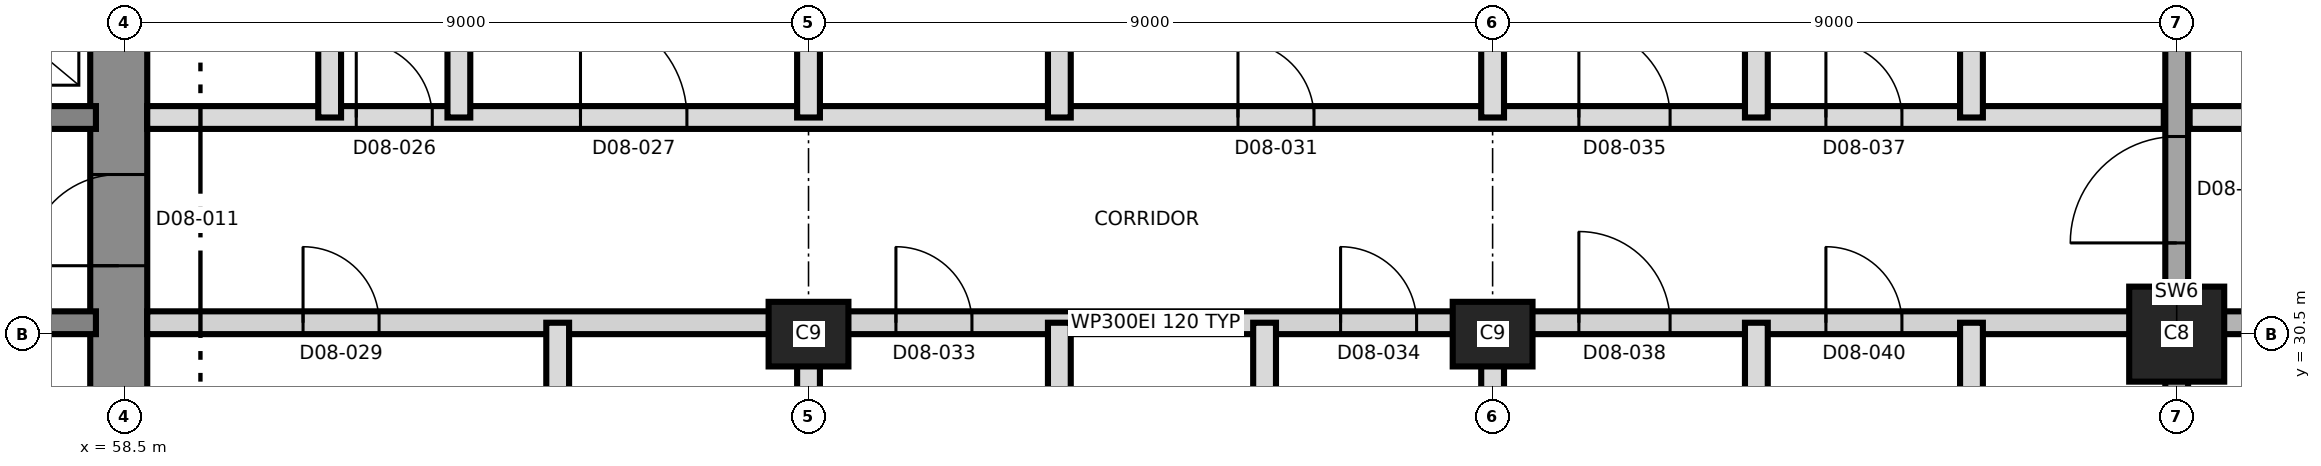
"""IFC4 building model, lengths in metres.
Left out: names, types, materials, properties, quantities, classifications, styles, units other than length and angle.
Written with IfcOpenShell. Run it as: python <this file> out.ifc"""

import sys

from ifc_helpers import new_model, si_unit, direction, frame, frame_2d, origin, origin_2d, place, context, subcontext, project, spatial, rectangle, extrude, element, fill, save


model = new_model("IFC4")
c1 = context("Model", 3, precision=1e-05, world=origin(), true_north=direction((0.0, 1.0)))
c2 = subcontext(c1, "Body", "Model", "MODEL_VIEW")
j1 = project(units=[si_unit("LENGTHUNIT", "METRE"), si_unit("PLANEANGLEUNIT", "RADIAN")], contexts=[c1])
p1 = place(None, origin())
s1 = spatial("IfcSite", under=j1, at=p1, CompositionType="ELEMENT")
p2 = place(p1, origin())
s2 = spatial("IfcBuilding", under=s1, at=p2, CompositionType="ELEMENT")
p3 = place(p2, frame((0.0, 0.0, 101.9)))
s3 = spatial("IfcBuildingStorey", under=s2, at=p3, CompositionType="ELEMENT", Elevation=101.9)
p4 = place(p3, frame((58.425, 21.125, 0.0), z_axis=(0.0, 0.0, 1.0), x_axis=(0.0, 1.0, 0.0)))
e1 = element("IfcWall", 1, at=p4, inside=s3, PredefinedType="SHEAR", context=c2, shape_type="SweptSolid", body=[
    extrude(rectangle(XDim=18.75, YDim=0.75, at=frame_2d((9.375, 0.0))), origin(), (0.0, 0.0, 1.0), 3.7),
])
p5 = place(p4, frame((10.275, 0.0, 0.0)))
e2 = element("IfcOpeningElement", 2, at=p5, cuts=e1, PredefinedType="OPENING", context=c2, shape_type="SweptSolid", body=[
    extrude(rectangle(XDim=1.2, YDim=2.1, at=frame_2d((0.6, 1.05))), frame((0.0, 0.385, 0.0), z_axis=(0.0, -1.0, 0.0), x_axis=(1.0, 0.0, 0.0)), (0.0, 0.0, 1.0), 0.77),
])
p6 = place(p3, frame((31.875, 30.65, 0.0), z_axis=(0.0, 0.0, 1.0), x_axis=(1.0, 0.0, 0.0)))
e3 = element("IfcWall", 3, at=p6, inside=s3, PredefinedType="SHEAR", context=c2, shape_type="SweptSolid", body=[
    extrude(rectangle(XDim=26.25, YDim=0.3, at=frame_2d((13.125, 0.0))), origin(), (0.0, 0.0, 1.0), 3.7),
])
p7 = place(p6, frame((24.625, 0.0, 0.0)))
e4 = element("IfcOpeningElement", 4, at=p7, cuts=e3, PredefinedType="OPENING", context=c2, shape_type="SweptSolid", body=[
    extrude(rectangle(XDim=1.0, YDim=2.1, at=frame_2d((0.5, 1.05))), frame((0.0, 0.16, 0.0), z_axis=(0.0, -1.0, 0.0), x_axis=(1.0, 0.0, 0.0)), (0.0, 0.0, 1.0), 0.32),
])
p8 = place(p6, frame((11.425, 0.0, 0.0)))
e5 = element("IfcOpeningElement", 5, at=p8, cuts=e3, PredefinedType="OPENING", context=c2, shape_type="SweptSolid", body=[
    extrude(rectangle(XDim=1.0, YDim=2.1, at=frame_2d((0.5, 1.05))), frame((0.0, 0.16, 0.0), z_axis=(0.0, -1.0, 0.0), x_axis=(1.0, 0.0, 0.0)), (0.0, 0.0, 1.0), 0.32),
])
p9 = place(p3, frame((31.875, 33.35, 0.0), z_axis=(0.0, 0.0, 1.0), x_axis=(1.0, 0.0, 0.0)))
e6 = element("IfcWall", 6, at=p9, inside=s3, PredefinedType="SHEAR", context=c2, shape_type="SweptSolid", body=[
    extrude(rectangle(XDim=26.25, YDim=0.3, at=frame_2d((13.125, 0.0))), origin(), (0.0, 0.0, 1.0), 3.7),
])
p10 = place(p9, frame((13.775, 0.0, 0.0)))
e7 = element("IfcOpeningElement", 7, at=p10, cuts=e6, PredefinedType="OPENING", context=c2, shape_type="SweptSolid", body=[
    extrude(rectangle(XDim=1.4, YDim=2.1, at=frame_2d((0.7, 1.05))), frame((0.0, 0.16, 0.0), z_axis=(0.0, -1.0, 0.0), x_axis=(1.0, 0.0, 0.0)), (0.0, 0.0, 1.0), 0.32),
])
p11 = place(p9, frame((5.25, 0.0, 0.0)))
e8 = element("IfcOpeningElement", 8, at=p11, cuts=e6, PredefinedType="OPENING", context=c2, shape_type="SweptSolid", body=[
    extrude(rectangle(XDim=1.2, YDim=2.1, at=frame_2d((0.6, 1.05))), frame((0.0, 0.16, 0.0), z_axis=(0.0, -1.0, 0.0), x_axis=(1.0, 0.0, 0.0)), (0.0, 0.0, 1.0), 0.32),
])
p12 = place(p9, frame((19.8, 0.0, 0.0)))
e9 = element("IfcOpeningElement", 9, at=p12, cuts=e6, PredefinedType="OPENING", context=c2, shape_type="SweptSolid", body=[
    extrude(rectangle(XDim=1.2, YDim=2.1, at=frame_2d((0.6, 1.05))), frame((0.0, 0.16, 0.0), z_axis=(0.0, -1.0, 0.0), x_axis=(1.0, 0.0, 0.0)), (0.0, 0.0, 1.0), 0.32),
])
for number, where, z_axis, x_axis in (
    (10, (67.5, 30.5, 0.0), (0.0, 0.0, 1.0), (1.0, 0.0, 0.0)),
    (11, (76.5, 30.5, 0.0), (0.0, 0.0, 1.0), (1.0, 0.0, 0.0)),
):
    element("IfcColumn", number, at=place(p3, frame(where, z_axis=z_axis, x_axis=x_axis)), inside=s3, PredefinedType="COLUMN", context=c2, shape_type="SweptSolid", body=[
        extrude(rectangle(XDim=1.05, YDim=0.85, at=origin_2d()), origin(), (0.0, 0.0, 1.0), 3.7),
    ])
p13 = place(p3, frame((85.5, 30.5, 0.0), z_axis=(0.0, 0.0, 1.0), x_axis=(1.0, 0.0, 0.0)))
e12 = element("IfcColumn", 12, at=p13, inside=s3, PredefinedType="COLUMN", context=c2, shape_type="SweptSolid", body=[
    extrude(rectangle(XDim=1.25, YDim=1.25, at=origin_2d()), origin(), (0.0, 0.0, 1.0), 3.7),
])
p14 = place(p3, frame((85.5, 21.53, 0.0), z_axis=(0.0, 0.0, 1.0), x_axis=(0.0, 1.0, 0.0)))
e13 = element("IfcWall", 13, at=p14, inside=s3, PredefinedType="SHEAR", context=c2, shape_type="SweptSolid", body=[
    extrude(rectangle(XDim=17.94, YDim=0.3, at=frame_2d((8.97, 0.0))), origin(), (0.0, 0.0, 1.0), 3.7),
])
p15 = place(p14, frame((10.17, 0.0, 0.0)))
e14 = element("IfcOpeningElement", 14, at=p15, cuts=e13, PredefinedType="OPENING", context=c2, shape_type="SweptSolid", body=[
    extrude(rectangle(XDim=1.4, YDim=2.1, at=frame_2d((0.7, 1.05))), frame((0.0, 0.16, 0.0), z_axis=(0.0, -1.0, 0.0), x_axis=(1.0, 0.0, 0.0)), (0.0, 0.0, 1.0), 0.32),
])
p16 = place(p3, frame((58.8, 30.65, 0.0), z_axis=(0.0, 0.0, 1.0), x_axis=(1.0, 0.0, 0.0)))
e15 = element("IfcWall", 15, at=p16, inside=s3, PredefinedType="PARTITIONING", context=c2, shape_type="SweptSolid", body=[
    extrude(rectangle(XDim=26.53, YDim=0.3, at=frame_2d((13.265, 0.0))), origin(), (0.0, 0.0, 1.0), 3.4),
])
p17 = place(p16, frame((2.05, 0.0, 0.0)))
e16 = element("IfcOpeningElement", 16, at=p17, cuts=e15, PredefinedType="OPENING", context=c2, shape_type="SweptSolid", body=[
    extrude(rectangle(XDim=1.0, YDim=2.4, at=frame_2d((0.5, 1.2))), frame((0.0, 0.16, 0.0), z_axis=(0.0, -1.0, 0.0), x_axis=(1.0, 0.0, 0.0)), (0.0, 0.0, 1.0), 0.32),
])
p18 = place(p16, frame((9.85, 0.0, 0.0)))
e17 = element("IfcOpeningElement", 17, at=p18, cuts=e15, PredefinedType="OPENING", context=c2, shape_type="SweptSolid", body=[
    extrude(rectangle(XDim=1.0, YDim=2.1, at=frame_2d((0.5, 1.05))), frame((0.0, 0.16, 0.0), z_axis=(0.0, -1.0, 0.0), x_axis=(1.0, 0.0, 0.0)), (0.0, 0.0, 1.0), 0.32),
])
p19 = place(p16, frame((15.7, 0.0, 0.0)))
e18 = element("IfcOpeningElement", 18, at=p19, cuts=e15, PredefinedType="OPENING", context=c2, shape_type="SweptSolid", body=[
    extrude(rectangle(XDim=1.0, YDim=2.1, at=frame_2d((0.5, 1.05))), frame((0.0, 0.16, 0.0), z_axis=(0.0, -1.0, 0.0), x_axis=(1.0, 0.0, 0.0)), (0.0, 0.0, 1.0), 0.32),
])
p20 = place(p16, frame((18.835, 0.0, 0.0)))
e19 = element("IfcOpeningElement", 19, at=p20, cuts=e15, PredefinedType="OPENING", context=c2, shape_type="SweptSolid", body=[
    extrude(rectangle(XDim=1.2, YDim=2.1, at=frame_2d((0.6, 1.05))), frame((0.0, 0.16, 0.0), z_axis=(0.0, -1.0, 0.0), x_axis=(1.0, 0.0, 0.0)), (0.0, 0.0, 1.0), 0.32),
])
p21 = place(p16, frame((22.085, 0.0, 0.0)))
e20 = element("IfcOpeningElement", 20, at=p21, cuts=e15, PredefinedType="OPENING", context=c2, shape_type="SweptSolid", body=[
    extrude(rectangle(XDim=1.0, YDim=2.1, at=frame_2d((0.5, 1.05))), frame((0.0, 0.16, 0.0), z_axis=(0.0, -1.0, 0.0), x_axis=(1.0, 0.0, 0.0)), (0.0, 0.0, 1.0), 0.32),
])
p22 = place(p3, frame((85.67, 30.65, 0.0), z_axis=(0.0, 0.0, 1.0), x_axis=(1.0, 0.0, 0.0)))
e21 = element("IfcWall", 21, at=p22, inside=s3, PredefinedType="SHEAR", context=c2, shape_type="SweptSolid", body=[
    extrude(rectangle(XDim=8.205, YDim=0.3, at=frame_2d((4.103, 0.0))), origin(), (0.0, 0.0, 1.0), 3.4),
])
p23 = place(p22, frame((2.08, 0.0, 0.0)))
e22 = element("IfcOpeningElement", 22, at=p23, cuts=e21, PredefinedType="OPENING", context=c2, shape_type="SweptSolid", body=[
    extrude(rectangle(XDim=1.2, YDim=2.1, at=frame_2d((0.6, 1.05))), frame((0.0, 0.16, 0.0), z_axis=(0.0, -1.0, 0.0), x_axis=(1.0, 0.0, 0.0)), (0.0, 0.0, 1.0), 0.32),
])
p24 = place(p22, frame((5.63, 0.0, 0.0)))
e23 = element("IfcOpeningElement", 23, at=p24, cuts=e21, PredefinedType="OPENING", context=c2, shape_type="SweptSolid", body=[
    extrude(rectangle(XDim=1.0, YDim=2.1, at=frame_2d((0.5, 1.05))), frame((0.0, 0.16, 0.0), z_axis=(0.0, -1.0, 0.0), x_axis=(1.0, 0.0, 0.0)), (0.0, 0.0, 1.0), 0.32),
])
p25 = place(p3, frame((58.8, 33.35, 0.0), z_axis=(0.0, 0.0, 1.0), x_axis=(1.0, 0.0, 0.0)))
e24 = element("IfcWall", 24, at=p25, inside=s3, PredefinedType="PARTITIONING", context=c2, shape_type="SweptSolid", body=[
    extrude(rectangle(XDim=26.53, YDim=0.3, at=frame_2d((13.265, 0.0))), origin(), (0.0, 0.0, 1.0), 3.4),
])
p26 = place(p25, frame((2.75, 0.0, 0.0)))
e25 = element("IfcOpeningElement", 25, at=p26, cuts=e24, PredefinedType="OPENING", context=c2, shape_type="SweptSolid", body=[
    extrude(rectangle(XDim=1.0, YDim=2.1, at=frame_2d((0.5, 1.05))), frame((0.0, 0.16, 0.0), z_axis=(0.0, -1.0, 0.0), x_axis=(1.0, 0.0, 0.0)), (0.0, 0.0, 1.0), 0.32),
])
p27 = place(p25, frame((5.7, 0.0, 0.0)))
e26 = element("IfcOpeningElement", 26, at=p27, cuts=e24, PredefinedType="OPENING", context=c2, shape_type="SweptSolid", body=[
    extrude(rectangle(XDim=1.4, YDim=2.1, at=frame_2d((0.7, 1.05))), frame((0.0, 0.16, 0.0), z_axis=(0.0, -1.0, 0.0), x_axis=(1.0, 0.0, 0.0)), (0.0, 0.0, 1.0), 0.32),
])
p28 = place(p25, frame((14.35, 0.0, 0.0)))
e27 = element("IfcOpeningElement", 27, at=p28, cuts=e24, PredefinedType="OPENING", context=c2, shape_type="SweptSolid", body=[
    extrude(rectangle(XDim=1.0, YDim=2.4, at=frame_2d((0.5, 1.2))), frame((0.0, 0.16, 0.0), z_axis=(0.0, -1.0, 0.0), x_axis=(1.0, 0.0, 0.0)), (0.0, 0.0, 1.0), 0.32),
])
p29 = place(p25, frame((18.835, 0.0, 0.0)))
e28 = element("IfcOpeningElement", 28, at=p29, cuts=e24, PredefinedType="OPENING", context=c2, shape_type="SweptSolid", body=[
    extrude(rectangle(XDim=1.2, YDim=2.1, at=frame_2d((0.6, 1.05))), frame((0.0, 0.16, 0.0), z_axis=(0.0, -1.0, 0.0), x_axis=(1.0, 0.0, 0.0)), (0.0, 0.0, 1.0), 0.32),
])
p30 = place(p25, frame((22.085, 0.0, 0.0)))
e29 = element("IfcOpeningElement", 29, at=p30, cuts=e24, PredefinedType="OPENING", context=c2, shape_type="SweptSolid", body=[
    extrude(rectangle(XDim=1.0, YDim=2.1, at=frame_2d((0.5, 1.05))), frame((0.0, 0.16, 0.0), z_axis=(0.0, -1.0, 0.0), x_axis=(1.0, 0.0, 0.0)), (0.0, 0.0, 1.0), 0.32),
])
p31 = place(p3, frame((85.67, 33.35, 0.0), z_axis=(0.0, 0.0, 1.0), x_axis=(1.0, 0.0, 0.0)))
e30 = element("IfcWall", 30, at=p31, inside=s3, PredefinedType="PARTITIONING", context=c2, shape_type="SweptSolid", body=[
    extrude(rectangle(XDim=8.685, YDim=0.3, at=frame_2d((4.343, 0.0))), origin(), (0.0, 0.0, 1.0), 3.4),
])
p32 = place(p31, frame((1.83, 0.0, 0.0)))
e31 = element("IfcOpeningElement", 31, at=p32, cuts=e30, PredefinedType="OPENING", context=c2, shape_type="SweptSolid", body=[
    extrude(rectangle(XDim=1.0, YDim=2.1, at=frame_2d((0.5, 1.05))), frame((0.0, 0.16, 0.0), z_axis=(0.0, -1.0, 0.0), x_axis=(1.0, 0.0, 0.0)), (0.0, 0.0, 1.0), 0.32),
])
p33 = place(p31, frame((5.63, 0.0, 0.0)))
e32 = element("IfcOpeningElement", 32, at=p33, cuts=e30, PredefinedType="OPENING", context=c2, shape_type="SweptSolid", body=[
    extrude(rectangle(XDim=1.0, YDim=2.1, at=frame_2d((0.5, 1.05))), frame((0.0, 0.16, 0.0), z_axis=(0.0, -1.0, 0.0), x_axis=(1.0, 0.0, 0.0)), (0.0, 0.0, 1.0), 0.32),
])
p34 = place(p3, frame((61.2, 33.35, 0.0), z_axis=(0.0, 0.0, 1.0), x_axis=(0.0, 1.0, 0.0)))
e33 = element("IfcWall", 33, at=p34, inside=s3, PredefinedType="PARTITIONING", context=c2, shape_type="SweptSolid", body=[
    extrude(rectangle(XDim=3.2, YDim=0.3, at=frame_2d((1.6, 0.0))), origin(), (0.0, 0.0, 1.0), 3.4),
])
p35 = place(p3, frame((62.9, 33.35, 0.0), z_axis=(0.0, 0.0, 1.0), x_axis=(0.0, 1.0, 0.0)))
e34 = element("IfcWall", 34, at=p35, inside=s3, PredefinedType="PARTITIONING", context=c2, shape_type="SweptSolid", body=[
    extrude(rectangle(XDim=6.3, YDim=0.3, at=frame_2d((3.15, 0.0))), origin(), (0.0, 0.0, 1.0), 3.4),
])
p36 = place(p3, frame((64.2, 27.15, 0.0), z_axis=(0.0, 0.0, 1.0), x_axis=(0.0, 1.0, 0.0)))
e35 = element("IfcWall", 35, at=p36, inside=s3, PredefinedType="PARTITIONING", context=c2, shape_type="SweptSolid", body=[
    extrude(rectangle(XDim=3.5, YDim=0.3, at=frame_2d((1.75, 0.0))), origin(), (0.0, 0.0, 1.0), 3.4),
])
p37 = place(p3, frame((67.5, 21.53, 0.0), z_axis=(0.0, 0.0, 1.0), x_axis=(0.0, 1.0, 0.0)))
e36 = element("IfcWall", 36, at=p37, inside=s3, PredefinedType="PARTITIONING", context=c2, shape_type="SweptSolid", body=[
    extrude(rectangle(XDim=9.12, YDim=0.3, at=frame_2d((4.56, 0.0))), origin(), (0.0, 0.0, 1.0), 3.4),
])
p38 = place(p3, frame((67.5, 33.35, 0.0), z_axis=(0.0, 0.0, 1.0), x_axis=(0.0, 1.0, 0.0)))
e37 = element("IfcWall", 37, at=p38, inside=s3, PredefinedType="PARTITIONING", context=c2, shape_type="SweptSolid", body=[
    extrude(rectangle(XDim=6.12, YDim=0.3, at=frame_2d((3.06, 0.0))), origin(), (0.0, 0.0, 1.0), 3.4),
])
p39 = place(p3, frame((70.8, 27.45, 0.0), z_axis=(0.0, 0.0, 1.0), x_axis=(0.0, 1.0, 0.0)))
e38 = element("IfcWall", 38, at=p39, inside=s3, PredefinedType="PARTITIONING", context=c2, shape_type="SweptSolid", body=[
    extrude(rectangle(XDim=3.2, YDim=0.3, at=frame_2d((1.6, 0.0))), origin(), (0.0, 0.0, 1.0), 3.4),
])
p40 = place(p3, frame((70.8, 33.35, 0.0), z_axis=(0.0, 0.0, 1.0), x_axis=(0.0, 1.0, 0.0)))
e39 = element("IfcWall", 39, at=p40, inside=s3, PredefinedType="PARTITIONING", context=c2, shape_type="SweptSolid", body=[
    extrude(rectangle(XDim=3.5, YDim=0.3, at=frame_2d((1.75, 0.0))), origin(), (0.0, 0.0, 1.0), 3.4),
])
for number, where, z_axis, x_axis in (
    (40, (73.5, 21.53, 0.0), (0.0, 0.0, 1.0), (0.0, 1.0, 0.0)),
    (41, (76.5, 21.53, 0.0), (0.0, 0.0, 1.0), (0.0, 1.0, 0.0)),
):
    element("IfcWall", number, at=place(p3, frame(where, z_axis=z_axis, x_axis=x_axis)), inside=s3, PredefinedType="PARTITIONING", context=c2, shape_type="SweptSolid", body=[
        extrude(rectangle(XDim=9.12, YDim=0.3, at=frame_2d((4.56, 0.0))), origin(), (0.0, 0.0, 1.0), 3.4),
    ])
p41 = place(p3, frame((76.5, 33.35, 0.0), z_axis=(0.0, 0.0, 1.0), x_axis=(0.0, 1.0, 0.0)))
e42 = element("IfcWall", 42, at=p41, inside=s3, PredefinedType="PARTITIONING", context=c2, shape_type="SweptSolid", body=[
    extrude(rectangle(XDim=6.12, YDim=0.3, at=frame_2d((3.06, 0.0))), origin(), (0.0, 0.0, 1.0), 3.4),
])
p42 = place(p3, frame((79.97, 21.53, 0.0), z_axis=(0.0, 0.0, 1.0), x_axis=(0.0, 1.0, 0.0)))
e43 = element("IfcWall", 43, at=p42, inside=s3, PredefinedType="PARTITIONING", context=c2, shape_type="SweptSolid", body=[
    extrude(rectangle(XDim=9.12, YDim=0.3, at=frame_2d((4.56, 0.0))), origin(), (0.0, 0.0, 1.0), 3.4),
])
p43 = place(p3, frame((79.97, 33.35, 0.0), z_axis=(0.0, 0.0, 1.0), x_axis=(0.0, 1.0, 0.0)))
e44 = element("IfcWall", 44, at=p43, inside=s3, PredefinedType="PARTITIONING", context=c2, shape_type="SweptSolid", body=[
    extrude(rectangle(XDim=6.3, YDim=0.3, at=frame_2d((3.15, 0.0))), origin(), (0.0, 0.0, 1.0), 3.4),
])
for number, where, z_axis, x_axis in (
    (45, (82.8, 27.45, 0.0), (0.0, 0.0, 1.0), (0.0, 1.0, 0.0)),
    (46, (82.8, 33.35, 0.0), (0.0, 0.0, 1.0), (0.0, 1.0, 0.0)),
):
    element("IfcWall", number, at=place(p3, frame(where, z_axis=z_axis, x_axis=x_axis)), inside=s3, PredefinedType="PARTITIONING", context=c2, shape_type="SweptSolid", body=[
        extrude(rectangle(XDim=3.2, YDim=0.3, at=frame_2d((1.6, 0.0))), origin(), (0.0, 0.0, 1.0), 3.4),
    ])
p44 = place(p5, origin())
e47 = element("IfcDoor", 47, at=p44, inside=s3, OperationType="SINGLE_SWING_LEFT", PredefinedType="DOOR", context=c2, shape_type="SweptSolid", body=[
    extrude(rectangle(XDim=1.2, YDim=2.1, at=frame_2d((0.6, 1.05))), frame((0.0, 0.025, 0.0), z_axis=(0.0, -1.0, 0.0), x_axis=(1.0, 0.0, 0.0)), (0.0, 0.0, 1.0), 0.05),
])
fill(e2, e47)
p45 = place(p26, origin())
e48 = element("IfcDoor", 48, at=p45, inside=s3, OperationType="SINGLE_SWING_LEFT", PredefinedType="DOOR", context=c2, shape_type="SweptSolid", body=[
    extrude(rectangle(XDim=1.0, YDim=2.1, at=frame_2d((0.5, 1.05))), frame((0.0, 0.025, 0.0), z_axis=(0.0, -1.0, 0.0), x_axis=(1.0, 0.0, 0.0)), (0.0, 0.0, 1.0), 0.05),
])
fill(e25, e48)
p46 = place(p27, origin())
e49 = element("IfcDoor", 49, at=p46, inside=s3, OperationType="SINGLE_SWING_RIGHT", PredefinedType="DOOR", context=c2, shape_type="SweptSolid", body=[
    extrude(rectangle(XDim=1.4, YDim=2.1, at=frame_2d((0.7, 1.05))), frame((0.0, 0.025, 0.0), z_axis=(0.0, -1.0, 0.0), x_axis=(1.0, 0.0, 0.0)), (0.0, 0.0, 1.0), 0.05),
])
fill(e26, e49)
p47 = place(p17, origin())
e50 = element("IfcDoor", 50, at=p47, inside=s3, OperationType="SINGLE_SWING_LEFT", PredefinedType="DOOR", context=c2, shape_type="SweptSolid", body=[
    extrude(rectangle(XDim=1.0, YDim=2.4, at=frame_2d((0.5, 1.2))), frame((0.0, 0.025, 0.0), z_axis=(0.0, -1.0, 0.0), x_axis=(1.0, 0.0, 0.0)), (0.0, 0.0, 1.0), 0.05),
])
fill(e16, e50)
p48 = place(p28, origin())
e51 = element("IfcDoor", 51, at=p48, inside=s3, OperationType="SINGLE_SWING_RIGHT", PredefinedType="DOOR", context=c2, shape_type="SweptSolid", body=[
    extrude(rectangle(XDim=1.0, YDim=2.4, at=frame_2d((0.5, 1.2))), frame((0.0, 0.025, 0.0), z_axis=(0.0, -1.0, 0.0), x_axis=(1.0, 0.0, 0.0)), (0.0, 0.0, 1.0), 0.05),
])
fill(e27, e51)
p49 = place(p18, origin())
e52 = element("IfcDoor", 52, at=p49, inside=s3, OperationType="SINGLE_SWING_LEFT", PredefinedType="DOOR", context=c2, shape_type="SweptSolid", body=[
    extrude(rectangle(XDim=1.0, YDim=2.1, at=frame_2d((0.5, 1.05))), frame((0.0, 0.025, 0.0), z_axis=(0.0, -1.0, 0.0), x_axis=(1.0, 0.0, 0.0)), (0.0, 0.0, 1.0), 0.05),
])
fill(e17, e52)
p50 = place(p19, origin())
e53 = element("IfcDoor", 53, at=p50, inside=s3, OperationType="SINGLE_SWING_LEFT", PredefinedType="DOOR", context=c2, shape_type="SweptSolid", body=[
    extrude(rectangle(XDim=1.0, YDim=2.1, at=frame_2d((0.5, 1.05))), frame((0.0, 0.025, 0.0), z_axis=(0.0, -1.0, 0.0), x_axis=(1.0, 0.0, 0.0)), (0.0, 0.0, 1.0), 0.05),
])
fill(e18, e53)
p51 = place(p29, origin())
e54 = element("IfcDoor", 54, at=p51, inside=s3, OperationType="SINGLE_SWING_LEFT", PredefinedType="DOOR", context=c2, shape_type="SweptSolid", body=[
    extrude(rectangle(XDim=1.2, YDim=2.1, at=frame_2d((0.6, 1.05))), frame((0.0, 0.025, 0.0), z_axis=(0.0, -1.0, 0.0), x_axis=(1.0, 0.0, 0.0)), (0.0, 0.0, 1.0), 0.05),
])
fill(e28, e54)
p52 = place(p30, origin())
e55 = element("IfcDoor", 55, at=p52, inside=s3, OperationType="SINGLE_SWING_RIGHT", PredefinedType="DOOR", context=c2, shape_type="SweptSolid", body=[
    extrude(rectangle(XDim=1.0, YDim=2.1, at=frame_2d((0.5, 1.05))), frame((0.0, 0.025, 0.0), z_axis=(0.0, -1.0, 0.0), x_axis=(1.0, 0.0, 0.0)), (0.0, 0.0, 1.0), 0.05),
])
fill(e29, e55)
p53 = place(p20, origin())
e56 = element("IfcDoor", 56, at=p53, inside=s3, OperationType="SINGLE_SWING_LEFT", PredefinedType="DOOR", context=c2, shape_type="SweptSolid", body=[
    extrude(rectangle(XDim=1.2, YDim=2.1, at=frame_2d((0.6, 1.05))), frame((0.0, 0.025, 0.0), z_axis=(0.0, -1.0, 0.0), x_axis=(1.0, 0.0, 0.0)), (0.0, 0.0, 1.0), 0.05),
])
fill(e19, e56)
p54 = place(p21, origin())
e57 = element("IfcDoor", 57, at=p54, inside=s3, OperationType="SINGLE_SWING_RIGHT", PredefinedType="DOOR", context=c2, shape_type="SweptSolid", body=[
    extrude(rectangle(XDim=1.0, YDim=2.1, at=frame_2d((0.5, 1.05))), frame((0.0, 0.025, 0.0), z_axis=(0.0, -1.0, 0.0), x_axis=(1.0, 0.0, 0.0)), (0.0, 0.0, 1.0), 0.05),
])
fill(e20, e57)
p55 = place(p15, origin())
e58 = element("IfcDoor", 58, at=p55, inside=s3, OperationType="SINGLE_SWING_RIGHT", PredefinedType="DOOR", context=c2, shape_type="SweptSolid", body=[
    extrude(rectangle(XDim=1.4, YDim=2.1, at=frame_2d((0.7, 1.05))), frame((0.0, 0.025, 0.0), z_axis=(0.0, -1.0, 0.0), x_axis=(1.0, 0.0, 0.0)), (0.0, 0.0, 1.0), 0.05),
])
fill(e14, e58)
save(model, sys.argv[1])
